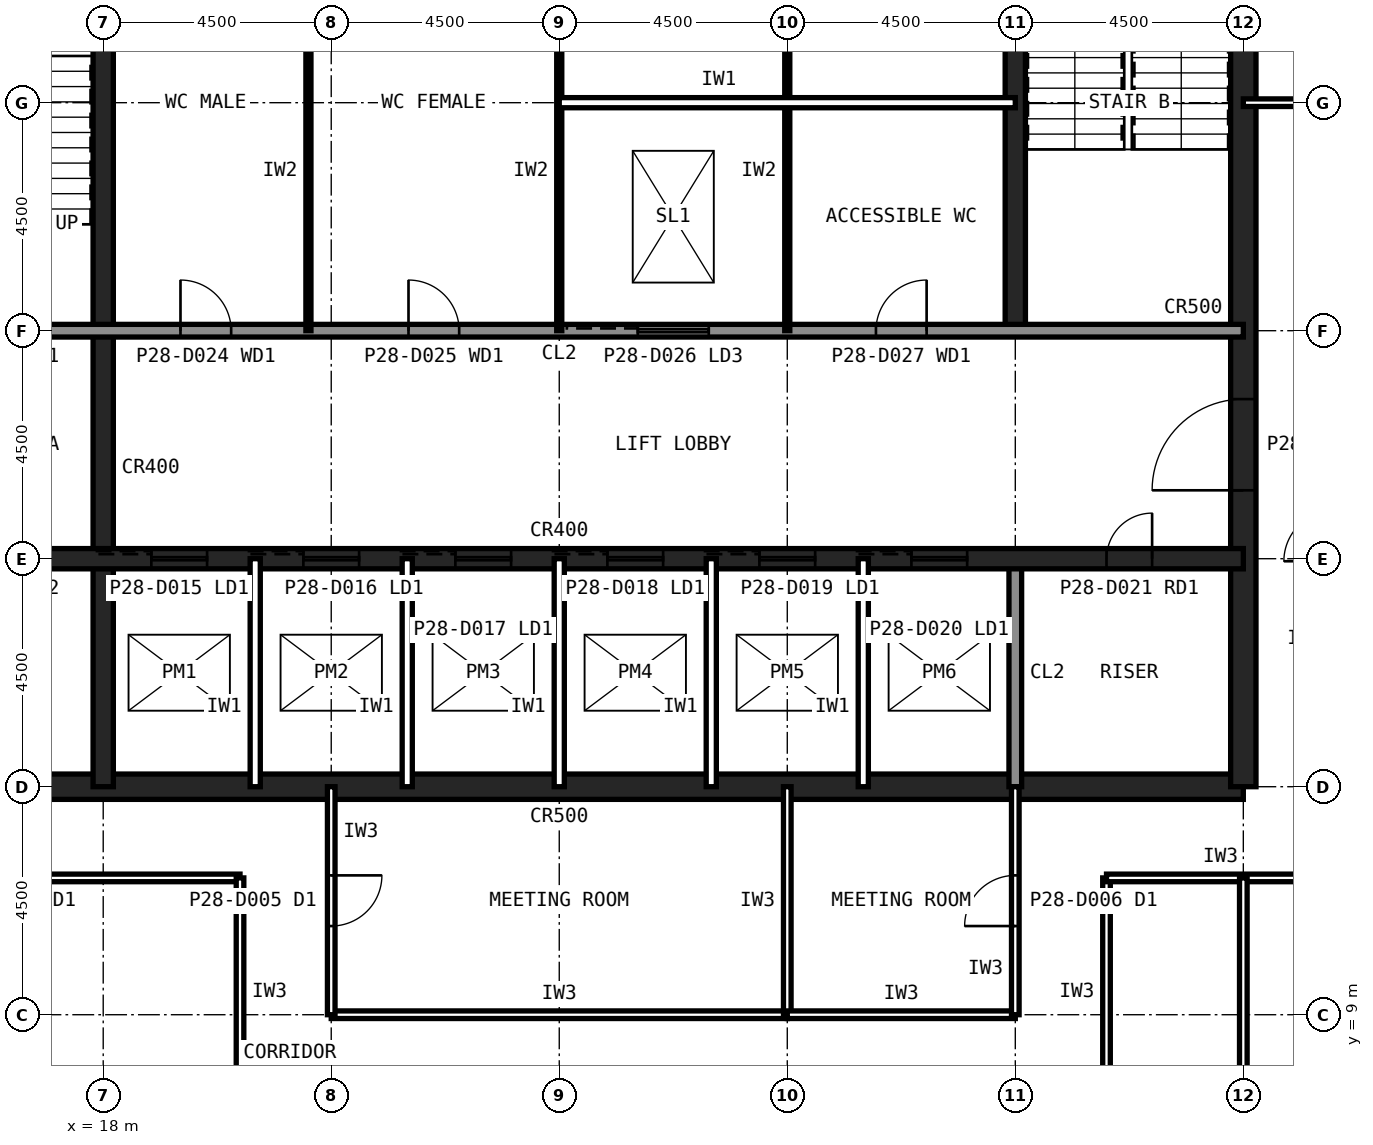
"""IFC4 building model, lengths in metres.
Left out: names, types, materials, properties, quantities, classifications, styles, units other than length and angle.
Written with IfcOpenShell. Run it as: python <this file> out.ifc"""

import sys

from ifc_helpers import new_model, si_unit, direction, frame, frame_2d, origin, place, context, subcontext, project, spatial, rectangle, extrude, element, fill, save


model = new_model("IFC4")
c1 = context("Model", 3, precision=1e-05, world=origin(), true_north=direction((0.0, 1.0)))
c2 = subcontext(c1, "Body", "Model", "MODEL_VIEW")
j1 = project(units=[si_unit("LENGTHUNIT", "METRE"), si_unit("PLANEANGLEUNIT", "RADIAN")], contexts=[c1])
p1 = place(None, origin())
s1 = spatial("IfcSite", under=j1, at=p1, CompositionType="ELEMENT")
p2 = place(p1, origin())
s2 = spatial("IfcBuilding", under=s1, at=p2, CompositionType="ELEMENT")
p3 = place(p2, frame((0.0, 0.0, 119.6)))
s3 = spatial("IfcBuildingStorey", under=s2, at=p3, CompositionType="ELEMENT", Elevation=119.6)
p4 = place(p3, frame((13.5, 13.5, 0.0), z_axis=(0.0, 0.0, 1.0), x_axis=(1.0, 0.0, 0.0)))
e1 = element("IfcWall", 1, at=p4, inside=s3, PredefinedType="SHEAR", context=c2, shape_type="SweptSolid", body=[
    extrude(rectangle(XDim=27.0, YDim=0.5, at=frame_2d((13.5, 0.0))), origin(), (0.0, 0.0, 1.0), 4.0),
])
p5 = place(p3, frame((40.5, 13.5, 0.0), z_axis=(0.0, 0.0, 1.0), x_axis=(0.0, 1.0, 0.0)))
e2 = element("IfcWall", 2, at=p5, inside=s3, PredefinedType="SHEAR", context=c2, shape_type="SweptSolid", body=[
    extrude(rectangle(XDim=27.0, YDim=0.5, at=frame_2d((13.5, 0.0))), origin(), (0.0, 0.0, 1.0), 4.0),
])
p6 = place(p5, frame((5.85, 0.0, 0.0)))
e3 = element("IfcOpeningElement", 3, at=p6, cuts=e2, PredefinedType="OPENING", context=c2, shape_type="SweptSolid", body=[
    extrude(rectangle(XDim=1.8, YDim=2.1, at=frame_2d((0.9, 1.05))), frame((0.0, 0.26, 0.0), z_axis=(0.0, -1.0, 0.0), x_axis=(1.0, 0.0, 0.0)), (0.0, 0.0, 1.0), 0.52),
])
p7 = place(p5, frame((19.65, 0.0, 0.0)))
e4 = element("IfcOpeningElement", 4, at=p7, cuts=e2, PredefinedType="OPENING", context=c2, shape_type="SweptSolid", body=[
    extrude(rectangle(XDim=1.2, YDim=2.1, at=frame_2d((0.6, 1.05))), frame((0.0, 0.26, 0.0), z_axis=(0.0, -1.0, 0.0), x_axis=(1.0, 0.0, 0.0)), (0.0, 0.0, 1.0), 0.52),
])
p8 = place(p3, frame((18.0, 13.5, 0.0), z_axis=(0.0, 0.0, 1.0), x_axis=(0.0, 1.0, 0.0)))
e5 = element("IfcWall", 5, at=p8, inside=s3, PredefinedType="SHEAR", context=c2, shape_type="SweptSolid", body=[
    extrude(rectangle(XDim=18.0, YDim=0.4, at=frame_2d((9.0, 0.0))), origin(), (0.0, 0.0, 1.0), 4.0),
])
p9 = place(p3, frame((36.0, 13.5, 0.0), z_axis=(0.0, 0.0, 1.0), x_axis=(0.0, 1.0, 0.0)))
e6 = element("IfcWall", 6, at=p9, inside=s3, PredefinedType="SOLIDWALL", context=c2, shape_type="SweptSolid", body=[
    extrude(rectangle(XDim=4.5, YDim=0.25, at=frame_2d((2.25, 0.0))), origin(), (0.0, 0.0, 1.0), 3.84),
])
p10 = place(p3, frame((36.0, 22.5, 0.0), z_axis=(0.0, 0.0, 1.0), x_axis=(0.0, 1.0, 0.0)))
e7 = element("IfcWall", 7, at=p10, inside=s3, PredefinedType="SHEAR", context=c2, shape_type="SweptSolid", body=[
    extrude(rectangle(XDim=18.0, YDim=0.4, at=frame_2d((9.0, 0.0))), origin(), (0.0, 0.0, 1.0), 4.0),
])
p11 = place(p3, frame((13.5, 18.0, 0.0), z_axis=(0.0, 0.0, 1.0), x_axis=(1.0, 0.0, 0.0)))
e8 = element("IfcWall", 8, at=p11, inside=s3, PredefinedType="SHEAR", context=c2, shape_type="SweptSolid", body=[
    extrude(rectangle(XDim=27.0, YDim=0.4, at=frame_2d((13.5, 0.0))), origin(), (0.0, 0.0, 1.0), 4.0),
])
p12 = place(p11, frame((24.3, 0.0, 0.0)))
e9 = element("IfcOpeningElement", 9, at=p12, cuts=e8, PredefinedType="OPENING", context=c2, shape_type="SweptSolid", body=[
    extrude(rectangle(XDim=0.9, YDim=2.1, at=frame_2d((0.45, 1.05))), frame((0.0, 0.21, 0.0), z_axis=(0.0, -1.0, 0.0), x_axis=(1.0, 0.0, 0.0)), (0.0, 0.0, 1.0), 0.42),
])
p13 = place(p11, frame((5.45, 0.0, 0.0)))
e10 = element("IfcOpeningElement", 10, at=p13, cuts=e8, PredefinedType="OPENING", context=c2, shape_type="SweptSolid", body=[
    extrude(rectangle(XDim=1.1, YDim=2.1, at=frame_2d((0.55, 1.05))), frame((0.0, 0.21, 0.0), z_axis=(0.0, -1.0, 0.0), x_axis=(1.0, 0.0, 0.0)), (0.0, 0.0, 1.0), 0.42),
])
p14 = place(p11, frame((8.45, 0.0, 0.0)))
e11 = element("IfcOpeningElement", 11, at=p14, cuts=e8, PredefinedType="OPENING", context=c2, shape_type="SweptSolid", body=[
    extrude(rectangle(XDim=1.1, YDim=2.1, at=frame_2d((0.55, 1.05))), frame((0.0, 0.21, 0.0), z_axis=(0.0, -1.0, 0.0), x_axis=(1.0, 0.0, 0.0)), (0.0, 0.0, 1.0), 0.42),
])
p15 = place(p11, frame((11.45, 0.0, 0.0)))
e12 = element("IfcOpeningElement", 12, at=p15, cuts=e8, PredefinedType="OPENING", context=c2, shape_type="SweptSolid", body=[
    extrude(rectangle(XDim=1.1, YDim=2.1, at=frame_2d((0.55, 1.05))), frame((0.0, 0.21, 0.0), z_axis=(0.0, -1.0, 0.0), x_axis=(1.0, 0.0, 0.0)), (0.0, 0.0, 1.0), 0.42),
])
p16 = place(p11, frame((14.45, 0.0, 0.0)))
e13 = element("IfcOpeningElement", 13, at=p16, cuts=e8, PredefinedType="OPENING", context=c2, shape_type="SweptSolid", body=[
    extrude(rectangle(XDim=1.1, YDim=2.1, at=frame_2d((0.55, 1.05))), frame((0.0, 0.21, 0.0), z_axis=(0.0, -1.0, 0.0), x_axis=(1.0, 0.0, 0.0)), (0.0, 0.0, 1.0), 0.42),
])
p17 = place(p11, frame((17.45, 0.0, 0.0)))
e14 = element("IfcOpeningElement", 14, at=p17, cuts=e8, PredefinedType="OPENING", context=c2, shape_type="SweptSolid", body=[
    extrude(rectangle(XDim=1.1, YDim=2.1, at=frame_2d((0.55, 1.05))), frame((0.0, 0.21, 0.0), z_axis=(0.0, -1.0, 0.0), x_axis=(1.0, 0.0, 0.0)), (0.0, 0.0, 1.0), 0.42),
])
p18 = place(p11, frame((20.45, 0.0, 0.0)))
e15 = element("IfcOpeningElement", 15, at=p18, cuts=e8, PredefinedType="OPENING", context=c2, shape_type="SweptSolid", body=[
    extrude(rectangle(XDim=1.1, YDim=2.1, at=frame_2d((0.55, 1.05))), frame((0.0, 0.21, 0.0), z_axis=(0.0, -1.0, 0.0), x_axis=(1.0, 0.0, 0.0)), (0.0, 0.0, 1.0), 0.42),
])
p19 = place(p11, frame((1.6, 0.0, 0.0)))
e16 = element("IfcOpeningElement", 16, at=p19, cuts=e8, PredefinedType="OPENING", context=c2, shape_type="SweptSolid", body=[
    extrude(rectangle(XDim=1.3, YDim=2.2, at=frame_2d((0.65, 1.1))), frame((0.0, 0.21, 0.0), z_axis=(0.0, -1.0, 0.0), x_axis=(1.0, 0.0, 0.0)), (0.0, 0.0, 1.0), 0.42),
])
p20 = place(p3, frame((13.5, 22.5, 0.0), z_axis=(0.0, 0.0, 1.0), x_axis=(1.0, 0.0, 0.0)))
e17 = element("IfcWall", 17, at=p20, inside=s3, PredefinedType="SOLIDWALL", context=c2, shape_type="SweptSolid", body=[
    extrude(rectangle(XDim=27.0, YDim=0.25, at=frame_2d((13.5, 0.0))), origin(), (0.0, 0.0, 1.0), 3.84),
])
p21 = place(p20, frame((1.65, 0.0, 0.0)))
e18 = element("IfcOpeningElement", 18, at=p21, cuts=e17, PredefinedType="OPENING", context=c2, shape_type="SweptSolid", body=[
    extrude(rectangle(XDim=1.2, YDim=2.1, at=frame_2d((0.6, 1.05))), frame((0.0, 0.135, 0.0), z_axis=(0.0, -1.0, 0.0), x_axis=(1.0, 0.0, 0.0)), (0.0, 0.0, 1.0), 0.27),
])
p22 = place(p20, frame((6.025, 0.0, 0.0)))
e19 = element("IfcOpeningElement", 19, at=p22, cuts=e17, PredefinedType="OPENING", context=c2, shape_type="SweptSolid", body=[
    extrude(rectangle(XDim=1.0, YDim=2.1, at=frame_2d((0.5, 1.05))), frame((0.0, 0.135, 0.0), z_axis=(0.0, -1.0, 0.0), x_axis=(1.0, 0.0, 0.0)), (0.0, 0.0, 1.0), 0.27),
])
p23 = place(p20, frame((10.525, 0.0, 0.0)))
e20 = element("IfcOpeningElement", 20, at=p23, cuts=e17, PredefinedType="OPENING", context=c2, shape_type="SweptSolid", body=[
    extrude(rectangle(XDim=1.0, YDim=2.1, at=frame_2d((0.5, 1.05))), frame((0.0, 0.135, 0.0), z_axis=(0.0, -1.0, 0.0), x_axis=(1.0, 0.0, 0.0)), (0.0, 0.0, 1.0), 0.27),
])
p24 = place(p20, frame((19.75, 0.0, 0.0)))
e21 = element("IfcOpeningElement", 21, at=p24, cuts=e17, PredefinedType="OPENING", context=c2, shape_type="SweptSolid", body=[
    extrude(rectangle(XDim=1.0, YDim=2.1, at=frame_2d((0.5, 1.05))), frame((0.0, 0.135, 0.0), z_axis=(0.0, -1.0, 0.0), x_axis=(1.0, 0.0, 0.0)), (0.0, 0.0, 1.0), 0.27),
])
p25 = place(p20, frame((15.05, 0.0, 0.0)))
e22 = element("IfcOpeningElement", 22, at=p25, cuts=e17, PredefinedType="OPENING", context=c2, shape_type="SweptSolid", body=[
    extrude(rectangle(XDim=1.4, YDim=2.4, at=frame_2d((0.7, 1.2))), frame((0.0, 0.135, 0.0), z_axis=(0.0, -1.0, 0.0), x_axis=(1.0, 0.0, 0.0)), (0.0, 0.0, 1.0), 0.27),
])
for number, where, z_axis, x_axis in (
    (23, (21.0, 13.5, 0.0), (0.0, 0.0, 1.0), (0.0, 1.0, 0.0)),
    (24, (24.0, 13.5, 0.0), (0.0, 0.0, 1.0), (0.0, 1.0, 0.0)),
    (25, (27.0, 13.5, 0.0), (0.0, 0.0, 1.0), (0.0, 1.0, 0.0)),
    (26, (30.0, 13.5, 0.0), (0.0, 0.0, 1.0), (0.0, 1.0, 0.0)),
    (27, (33.0, 13.5, 0.0), (0.0, 0.0, 1.0), (0.0, 1.0, 0.0)),
):
    element("IfcWall", number, at=place(p3, frame(where, z_axis=z_axis, x_axis=x_axis)), inside=s3, PredefinedType="PARTITIONING", context=c2, shape_type="SweptSolid", body=[
        extrude(rectangle(XDim=4.5, YDim=0.2, at=frame_2d((2.25, 0.0))), origin(), (0.0, 0.0, 1.0), 3.84),
    ])
for number, where, z_axis, x_axis in (
    (28, (22.05, 22.5, 0.0), (0.0, 0.0, 1.0), (0.0, 1.0, 0.0)),
    (29, (27.0, 22.5, 0.0), (0.0, 0.0, 1.0), (0.0, 1.0, 0.0)),
    (30, (31.5, 22.5, 0.0), (0.0, 0.0, 1.0), (0.0, 1.0, 0.0)),
):
    element("IfcWall", number, at=place(p3, frame(where, z_axis=z_axis, x_axis=x_axis)), inside=s3, PredefinedType="PLUMBINGWALL", context=c2, shape_type="SweptSolid", body=[
        extrude(rectangle(XDim=9.0, YDim=0.1, at=frame_2d((4.5, 0.0))), origin(), (0.0, 0.0, 1.0), 3.84),
    ])
p26 = place(p3, frame((27.0, 27.0, 0.0), z_axis=(0.0, 0.0, 1.0), x_axis=(1.0, 0.0, 0.0)))
e31 = element("IfcWall", 31, at=p26, inside=s3, PredefinedType="PARTITIONING", context=c2, shape_type="SweptSolid", body=[
    extrude(rectangle(XDim=9.0, YDim=0.2, at=frame_2d((4.5, 0.0))), origin(), (0.0, 0.0, 1.0), 3.84),
])
p27 = place(p3, frame((40.5, 27.0, 0.0), z_axis=(0.0, 0.0, 1.0), x_axis=(1.0, 0.0, 0.0)))
e32 = element("IfcWall", 32, at=p27, inside=s3, PredefinedType="PARTITIONING", context=c2, shape_type="SweptSolid", body=[
    extrude(rectangle(XDim=13.115, YDim=0.15, at=frame_2d((6.558, 0.0))), origin(), (0.0, 0.0, 1.0), 2.989),
])
p28 = place(p3, frame((11.7, 11.7, 0.0), z_axis=(0.0, 0.0, 1.0), x_axis=(1.0, 0.0, 0.0)))
e33 = element("IfcWall", 33, at=p28, inside=s3, PredefinedType="PARTITIONING", context=c2, shape_type="SweptSolid", body=[
    extrude(rectangle(XDim=9.0, YDim=0.15, at=frame_2d((4.5, 0.0))), origin(), (0.0, 0.0, 1.0), 3.84),
])
p29 = place(p28, frame((4.0, 0.0, 0.0)))
e34 = element("IfcOpeningElement", 34, at=p29, cuts=e33, PredefinedType="OPENING", context=c2, shape_type="SweptSolid", body=[
    extrude(rectangle(XDim=1.0, YDim=2.1, at=frame_2d((0.5, 1.05))), frame((0.0, 0.085, 0.0), z_axis=(0.0, -1.0, 0.0), x_axis=(1.0, 0.0, 0.0)), (0.0, 0.0, 1.0), 0.17),
])
for number, where, z_axis, x_axis in (
    (35, (20.7, 11.7, 0.0), (0.0, 0.0, 1.0), (0.0, -1.0, 0.0)),
    (36, (37.8, 7.2, 0.0), (0.0, 0.0, 1.0), (0.0, 1.0, 0.0)),
    (37, (37.8, 11.7, 0.0), (0.0, 0.0, 1.0), (1.0, 0.0, 0.0)),
):
    element("IfcWall", number, at=place(p3, frame(where, z_axis=z_axis, x_axis=x_axis)), inside=s3, PredefinedType="PARTITIONING", context=c2, shape_type="SweptSolid", body=[
        extrude(rectangle(XDim=4.5, YDim=0.15, at=frame_2d((2.25, 0.0))), origin(), (0.0, 0.0, 1.0), 3.84),
    ])
p30 = place(p3, frame((22.5, 9.0, 0.0), z_axis=(0.0, 0.0, 1.0), x_axis=(1.0, 0.0, 0.0)))
e38 = element("IfcWall", 38, at=p30, inside=s3, PredefinedType="PARTITIONING", context=c2, shape_type="SweptSolid", body=[
    extrude(rectangle(XDim=9.0, YDim=0.15, at=frame_2d((4.5, 0.0))), origin(), (0.0, 0.0, 1.0), 3.84),
])
p31 = place(p3, frame((31.5, 9.0, 0.0), z_axis=(0.0, 0.0, 1.0), x_axis=(0.0, 1.0, 0.0)))
e39 = element("IfcWall", 39, at=p31, inside=s3, PredefinedType="PARTITIONING", context=c2, shape_type="SweptSolid", body=[
    extrude(rectangle(XDim=4.5, YDim=0.15, at=frame_2d((2.25, 0.0))), origin(), (0.0, 0.0, 1.0), 2.989),
])
p32 = place(p3, frame((22.5, 13.5, 0.0), z_axis=(0.0, 0.0, 1.0), x_axis=(0.0, -1.0, 0.0)))
e40 = element("IfcWall", 40, at=p32, inside=s3, PredefinedType="PARTITIONING", context=c2, shape_type="SweptSolid", body=[
    extrude(rectangle(XDim=4.5, YDim=0.15, at=frame_2d((2.25, 0.0))), origin(), (0.0, 0.0, 1.0), 2.989),
])
p33 = place(p32, frame((1.75, 0.0, 0.0)))
e41 = element("IfcOpeningElement", 41, at=p33, cuts=e40, PredefinedType="OPENING", context=c2, shape_type="SweptSolid", body=[
    extrude(rectangle(XDim=1.0, YDim=2.1, at=frame_2d((0.5, 1.05))), frame((0.0, 0.085, 0.0), z_axis=(0.0, -1.0, 0.0), x_axis=(1.0, 0.0, 0.0)), (0.0, 0.0, 1.0), 0.17),
])
p34 = place(p3, frame((31.5, 9.0, 0.0), z_axis=(0.0, 0.0, 1.0), x_axis=(1.0, 0.0, 0.0)))
e42 = element("IfcWall", 42, at=p34, inside=s3, PredefinedType="PARTITIONING", context=c2, shape_type="SweptSolid", body=[
    extrude(rectangle(XDim=4.5, YDim=0.15, at=frame_2d((2.25, 0.0))), origin(), (0.0, 0.0, 1.0), 3.84),
])
p35 = place(p3, frame((36.0, 9.0, 0.0), z_axis=(0.0, 0.0, 1.0), x_axis=(0.0, 1.0, 0.0)))
e43 = element("IfcWall", 43, at=p35, inside=s3, PredefinedType="PARTITIONING", context=c2, shape_type="SweptSolid", body=[
    extrude(rectangle(XDim=4.5, YDim=0.15, at=frame_2d((2.25, 0.0))), origin(), (0.0, 0.0, 1.0), 2.989),
])
p36 = place(p35, frame((1.75, 0.0, 0.0)))
e44 = element("IfcOpeningElement", 44, at=p36, cuts=e43, PredefinedType="OPENING", context=c2, shape_type="SweptSolid", body=[
    extrude(rectangle(XDim=1.0, YDim=2.1, at=frame_2d((0.5, 1.05))), frame((0.0, 0.085, 0.0), z_axis=(0.0, -1.0, 0.0), x_axis=(1.0, 0.0, 0.0)), (0.0, 0.0, 1.0), 0.17),
])
p37 = place(p3, frame((40.5, 0.42, 0.0), z_axis=(0.0, 0.0, 1.0), x_axis=(0.0, 1.0, 0.0)))
e45 = element("IfcWall", 45, at=p37, inside=s3, PredefinedType="PARTITIONING", context=c2, shape_type="SweptSolid", body=[
    extrude(rectangle(XDim=11.28, YDim=0.15, at=frame_2d((5.64, 0.0))), origin(), (0.0, 0.0, 1.0), 2.989),
])
p38 = place(p37, frame((5.14, 0.0, 0.0)))
e46 = element("IfcOpeningElement", 46, at=p38, cuts=e45, PredefinedType="OPENING", context=c2, shape_type="SweptSolid", body=[
    extrude(rectangle(XDim=1.0, YDim=2.1, at=frame_2d((0.5, 1.05))), frame((0.0, 0.085, 0.0), z_axis=(0.0, -1.0, 0.0), x_axis=(1.0, 0.0, 0.0)), (0.0, 0.0, 1.0), 0.17),
])
p39 = place(p6, origin())
e47 = element("IfcDoor", 47, at=p39, inside=s3, OperationType="SINGLE_SWING_LEFT", PredefinedType="DOOR", context=c2, shape_type="SweptSolid", body=[
    extrude(rectangle(XDim=1.8, YDim=2.1, at=frame_2d((0.9, 1.05))), frame((0.0, 0.025, 0.0), z_axis=(0.0, -1.0, 0.0), x_axis=(1.0, 0.0, 0.0)), (0.0, 0.0, 1.0), 0.05),
])
fill(e3, e47)
p40 = place(p22, origin())
e48 = element("IfcDoor", 48, at=p40, inside=s3, OperationType="SINGLE_SWING_LEFT", PredefinedType="DOOR", context=c2, shape_type="SweptSolid", body=[
    extrude(rectangle(XDim=1.0, YDim=2.1, at=frame_2d((0.5, 1.05))), frame((0.0, 0.025, 0.0), z_axis=(0.0, -1.0, 0.0), x_axis=(1.0, 0.0, 0.0)), (0.0, 0.0, 1.0), 0.05),
])
fill(e19, e48)
p41 = place(p23, origin())
e49 = element("IfcDoor", 49, at=p41, inside=s3, OperationType="SINGLE_SWING_LEFT", PredefinedType="DOOR", context=c2, shape_type="SweptSolid", body=[
    extrude(rectangle(XDim=1.0, YDim=2.1, at=frame_2d((0.5, 1.05))), frame((0.0, 0.025, 0.0), z_axis=(0.0, -1.0, 0.0), x_axis=(1.0, 0.0, 0.0)), (0.0, 0.0, 1.0), 0.05),
])
fill(e20, e49)
p42 = place(p24, origin())
e50 = element("IfcDoor", 50, at=p42, inside=s3, OperationType="SINGLE_SWING_RIGHT", PredefinedType="DOOR", context=c2, shape_type="SweptSolid", body=[
    extrude(rectangle(XDim=1.0, YDim=2.1, at=frame_2d((0.5, 1.05))), frame((0.0, 0.025, 0.0), z_axis=(0.0, -1.0, 0.0), x_axis=(1.0, 0.0, 0.0)), (0.0, 0.0, 1.0), 0.05),
])
fill(e21, e50)
p43 = place(p12, origin())
e51 = element("IfcDoor", 51, at=p43, inside=s3, OperationType="SINGLE_SWING_RIGHT", PredefinedType="DOOR", context=c2, shape_type="SweptSolid", body=[
    extrude(rectangle(XDim=0.9, YDim=2.1, at=frame_2d((0.45, 1.05))), frame((0.0, 0.025, 0.0), z_axis=(0.0, -1.0, 0.0), x_axis=(1.0, 0.0, 0.0)), (0.0, 0.0, 1.0), 0.05),
])
fill(e9, e51)
p44 = place(p13, origin())
e52 = element("IfcDoor", 52, at=p44, inside=s3, OperationType="SLIDING_TO_LEFT", PredefinedType="DOOR", context=c2, shape_type="SweptSolid", body=[
    extrude(rectangle(XDim=1.1, YDim=2.1, at=frame_2d((0.55, 1.05))), frame((0.0, 0.025, 0.0), z_axis=(0.0, -1.0, 0.0), x_axis=(1.0, 0.0, 0.0)), (0.0, 0.0, 1.0), 0.05),
])
fill(e10, e52)
p45 = place(p14, origin())
e53 = element("IfcDoor", 53, at=p45, inside=s3, OperationType="SLIDING_TO_LEFT", PredefinedType="DOOR", context=c2, shape_type="SweptSolid", body=[
    extrude(rectangle(XDim=1.1, YDim=2.1, at=frame_2d((0.55, 1.05))), frame((0.0, 0.025, 0.0), z_axis=(0.0, -1.0, 0.0), x_axis=(1.0, 0.0, 0.0)), (0.0, 0.0, 1.0), 0.05),
])
fill(e11, e53)
p46 = place(p15, origin())
e54 = element("IfcDoor", 54, at=p46, inside=s3, OperationType="SLIDING_TO_LEFT", PredefinedType="DOOR", context=c2, shape_type="SweptSolid", body=[
    extrude(rectangle(XDim=1.1, YDim=2.1, at=frame_2d((0.55, 1.05))), frame((0.0, 0.025, 0.0), z_axis=(0.0, -1.0, 0.0), x_axis=(1.0, 0.0, 0.0)), (0.0, 0.0, 1.0), 0.05),
])
fill(e12, e54)
p47 = place(p16, origin())
e55 = element("IfcDoor", 55, at=p47, inside=s3, OperationType="SLIDING_TO_LEFT", PredefinedType="DOOR", context=c2, shape_type="SweptSolid", body=[
    extrude(rectangle(XDim=1.1, YDim=2.1, at=frame_2d((0.55, 1.05))), frame((0.0, 0.025, 0.0), z_axis=(0.0, -1.0, 0.0), x_axis=(1.0, 0.0, 0.0)), (0.0, 0.0, 1.0), 0.05),
])
fill(e13, e55)
p48 = place(p17, origin())
e56 = element("IfcDoor", 56, at=p48, inside=s3, OperationType="SLIDING_TO_LEFT", PredefinedType="DOOR", context=c2, shape_type="SweptSolid", body=[
    extrude(rectangle(XDim=1.1, YDim=2.1, at=frame_2d((0.55, 1.05))), frame((0.0, 0.025, 0.0), z_axis=(0.0, -1.0, 0.0), x_axis=(1.0, 0.0, 0.0)), (0.0, 0.0, 1.0), 0.05),
])
fill(e14, e56)
p49 = place(p18, origin())
e57 = element("IfcDoor", 57, at=p49, inside=s3, OperationType="SLIDING_TO_LEFT", PredefinedType="DOOR", context=c2, shape_type="SweptSolid", body=[
    extrude(rectangle(XDim=1.1, YDim=2.1, at=frame_2d((0.55, 1.05))), frame((0.0, 0.025, 0.0), z_axis=(0.0, -1.0, 0.0), x_axis=(1.0, 0.0, 0.0)), (0.0, 0.0, 1.0), 0.05),
])
fill(e15, e57)
p50 = place(p25, origin())
e58 = element("IfcDoor", 58, at=p50, inside=s3, OperationType="SLIDING_TO_LEFT", PredefinedType="DOOR", context=c2, shape_type="SweptSolid", body=[
    extrude(rectangle(XDim=1.4, YDim=2.4, at=frame_2d((0.7, 1.2))), frame((0.0, 0.025, 0.0), z_axis=(0.0, -1.0, 0.0), x_axis=(1.0, 0.0, 0.0)), (0.0, 0.0, 1.0), 0.05),
])
fill(e22, e58)
p51 = place(p33, origin())
e59 = element("IfcDoor", 59, at=p51, inside=s3, OperationType="SINGLE_SWING_LEFT", PredefinedType="DOOR", context=c2, shape_type="SweptSolid", body=[
    extrude(rectangle(XDim=1.0, YDim=2.1, at=frame_2d((0.5, 1.05))), frame((0.0, 0.025, 0.0), z_axis=(0.0, -1.0, 0.0), x_axis=(1.0, 0.0, 0.0)), (0.0, 0.0, 1.0), 0.05),
])
fill(e41, e59)
p52 = place(p36, origin())
e60 = element("IfcDoor", 60, at=p52, inside=s3, OperationType="SINGLE_SWING_LEFT", PredefinedType="DOOR", context=c2, shape_type="SweptSolid", body=[
    extrude(rectangle(XDim=1.0, YDim=2.1, at=frame_2d((0.5, 1.05))), frame((0.0, 0.025, 0.0), z_axis=(0.0, -1.0, 0.0), x_axis=(1.0, 0.0, 0.0)), (0.0, 0.0, 1.0), 0.05),
])
fill(e44, e60)
save(model, sys.argv[1])
